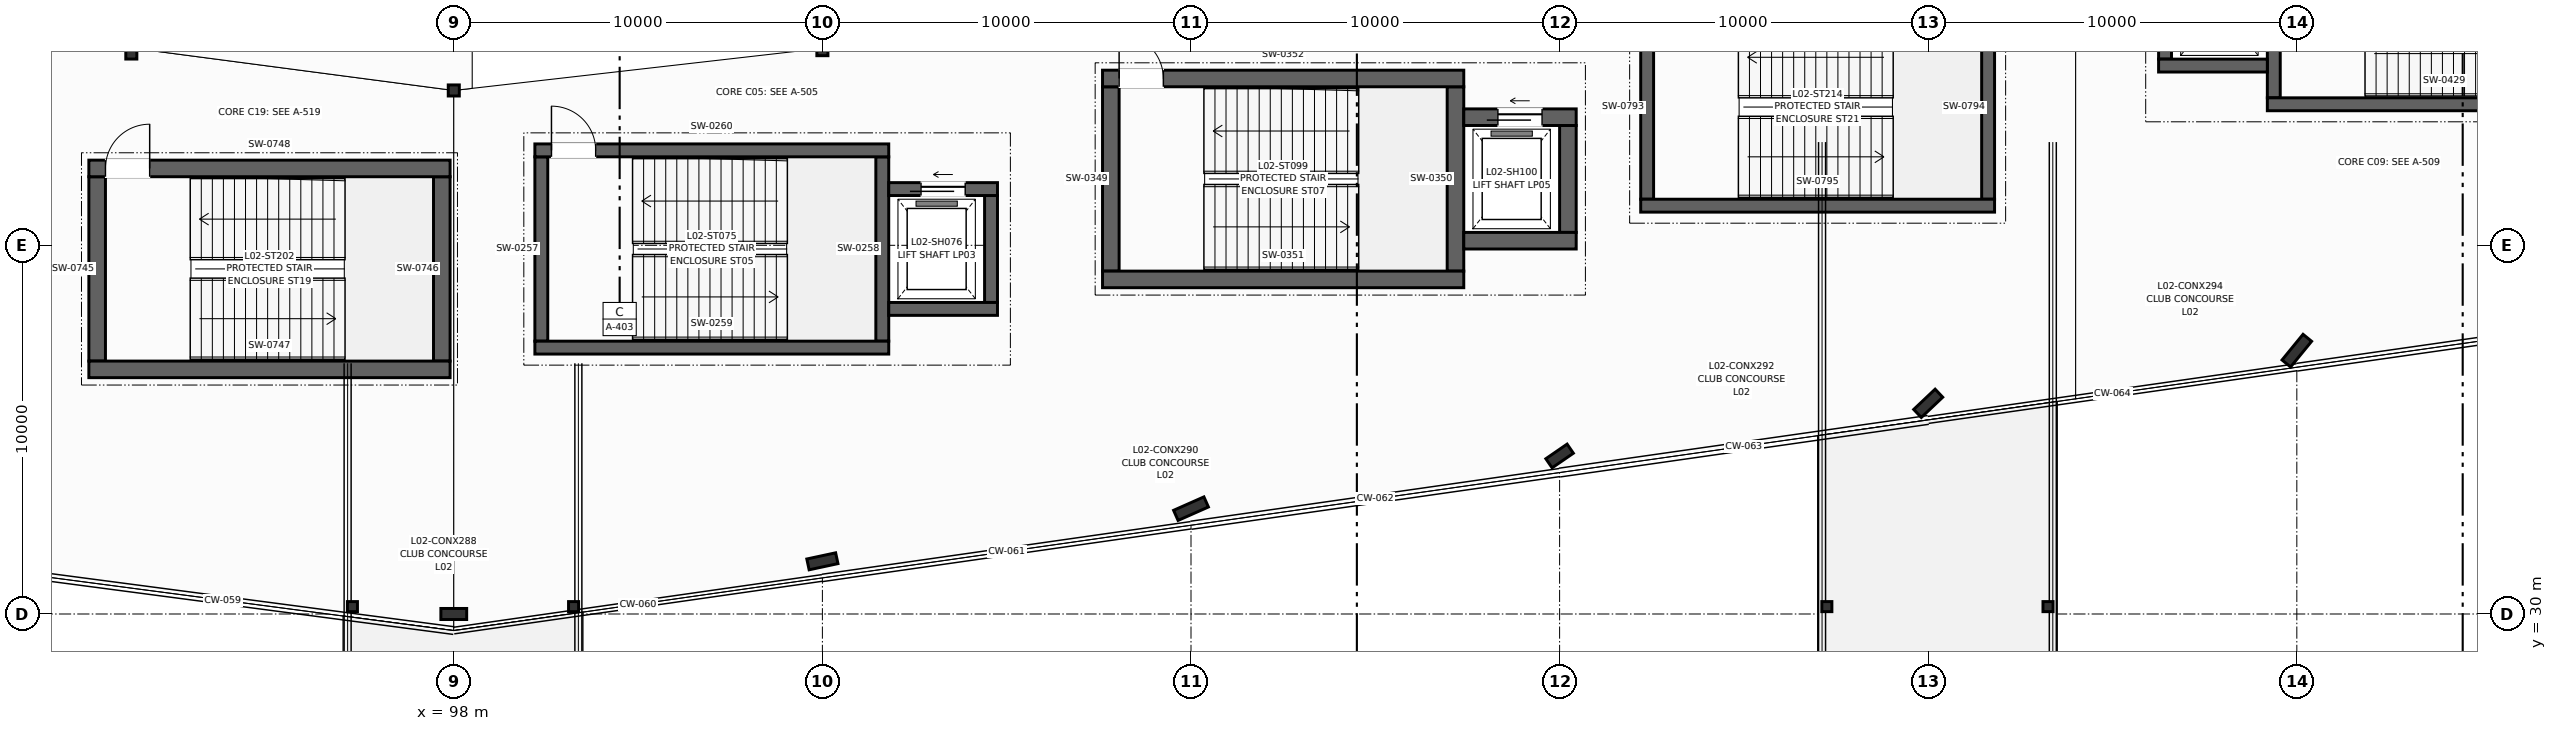
"""IFC4 building model, lengths in metres.
Left out: names, types, materials, properties, quantities, classifications, styles, units other than length and angle.
Written with IfcOpenShell. Run it as: python <this file> out.ifc"""

import sys

from ifc_helpers import new_model, si_unit, direction, frame, frame_2d, origin, origin_2d, place, context, subcontext, project, spatial, rectangle, hollow_circle, i_section, extrude, element, fill, save


model = new_model("IFC4")
c1 = context("Model", 3, precision=1e-05, world=origin(), true_north=direction((0.0, 1.0)))
c2 = subcontext(c1, "Body", "Model", "MODEL_VIEW")
j1 = project(units=[si_unit("LENGTHUNIT", "METRE"), si_unit("PLANEANGLEUNIT", "RADIAN")], contexts=[c1])
p1 = place(None, origin())
s1 = spatial("IfcSite", under=j1, at=p1, CompositionType="ELEMENT")
p2 = place(p1, origin())
s2 = spatial("IfcBuilding", under=s1, at=p2, CompositionType="ELEMENT")
p3 = place(p2, frame((0.0, 0.0, 9.0)))
s3 = spatial("IfcBuildingStorey", under=s2, at=p3, CompositionType="ELEMENT", Elevation=9.0)
p4 = place(p3, frame((89.252, 45.352, 0.0), z_axis=(0.0, 0.0, 1.0), x_axis=(1.0, 0.0, 0.0)))
e1 = element("IfcColumn", 1, at=p4, inside=s3, PredefinedType="COLUMN", context=c2, shape_type="SweptSolid", body=[
    extrude(i_section(OverallWidth=0.3, OverallDepth=0.6, WebThickness=0.015, FlangeThickness=0.03, at=origin_2d()), origin(), (0.0, 0.0, 1.0), 4.5),
])
p5 = place(p3, frame((98.0, 44.2, 0.0), z_axis=(0.0, 0.0, 1.0), x_axis=(1.0, 0.0, 0.0)))
e2 = element("IfcColumn", 2, at=p5, inside=s3, PredefinedType="COLUMN", context=c2, shape_type="SweptSolid", body=[
    extrude(i_section(OverallWidth=0.3, OverallDepth=0.3, WebThickness=0.011, FlangeThickness=0.019, at=origin_2d()), origin(), (0.0, 0.0, 1.0), 4.5),
])
p6 = place(p3, frame((108.0, 45.343, 0.0), z_axis=(0.0, 0.0, 1.0), x_axis=(1.0, 0.0, 0.0)))
e3 = element("IfcColumn", 3, at=p6, inside=s3, PredefinedType="COLUMN", context=c2, shape_type="SweptSolid", body=[
    extrude(i_section(OverallWidth=0.3, OverallDepth=0.4, WebThickness=0.013, FlangeThickness=0.024, at=origin_2d()), origin(), (0.0, 0.0, 1.0), 4.5),
])
p7 = place(p3, frame((98.0, 30.0, 0.0), z_axis=(0.0, 0.0, 1.0), x_axis=(0.0, 1.0, 0.0)))
e4 = element("IfcColumn", 4, at=p7, inside=s3, PredefinedType="COLUMN", context=c2, shape_type="SweptSolid", body=[
    extrude(i_section(OverallWidth=0.3, OverallDepth=0.7, WebThickness=0.017, FlangeThickness=0.032, at=origin_2d()), origin(), (0.0, 0.0, 1.0), 4.5),
])
p8 = place(p3, frame((108.0, 31.429, 0.0), z_axis=(0.0, 0.0, 1.0), x_axis=(-0.209618562904, 0.977783236759, 0.0)))
e5 = element("IfcColumn", 5, at=p8, inside=s3, PredefinedType="COLUMN", context=c2, shape_type="SweptSolid", body=[
    extrude(i_section(OverallWidth=0.3, OverallDepth=0.8, WebThickness=0.018, FlangeThickness=0.033, at=origin_2d()), origin(), (0.0, 0.0, 1.0), 4.5),
])
p9 = place(p3, frame((118.0, 32.857, 0.0), z_axis=(0.0, 0.0, 1.0), x_axis=(-0.40514158678, 0.914253955234, 0.0)))
e6 = element("IfcColumn", 6, at=p9, inside=s3, PredefinedType="COLUMN", context=c2, shape_type="SweptSolid", body=[
    extrude(i_section(OverallWidth=0.3, OverallDepth=0.9, WebThickness=0.019, FlangeThickness=0.035, at=origin_2d()), origin(), (0.0, 0.0, 1.0), 4.5),
])
p10 = place(p3, frame((128.0, 34.286, 0.0), z_axis=(0.0, 0.0, 1.0), x_axis=(-0.566406236925, 0.824126188622, 0.0)))
e7 = element("IfcColumn", 7, at=p10, inside=s3, PredefinedType="COLUMN", context=c2, shape_type="SweptSolid", body=[
    extrude(i_section(OverallWidth=0.3, OverallDepth=0.7, WebThickness=0.017, FlangeThickness=0.032, at=origin_2d()), origin(), (0.0, 0.0, 1.0), 4.5),
])
p11 = place(p3, frame((138.0, 35.714, 0.0), z_axis=(0.0, 0.0, 1.0), x_axis=(-0.687087510804, 0.726574670971, 0.0)))
e8 = element("IfcColumn", 8, at=p11, inside=s3, PredefinedType="COLUMN", context=c2, shape_type="SweptSolid", body=[
    extrude(i_section(OverallWidth=0.3, OverallDepth=0.8, WebThickness=0.018, FlangeThickness=0.033, at=origin_2d()), origin(), (0.0, 0.0, 1.0), 4.5),
])
p12 = place(p3, frame((148.0, 37.143, 0.0), z_axis=(0.0, 0.0, 1.0), x_axis=(-0.773840209727, 0.633380872628, 0.0)))
e9 = element("IfcColumn", 9, at=p12, inside=s3, PredefinedType="COLUMN", context=c2, shape_type="SweptSolid", body=[
    extrude(i_section(OverallWidth=0.3, OverallDepth=0.9, WebThickness=0.019, FlangeThickness=0.035, at=origin_2d()), origin(), (0.0, 0.0, 1.0), 4.5),
])
for number, where, z_axis, x_axis in (
    (10, (95.25, 30.2, 0.0), (0.0, 0.0, 1.0), (1.0, 0.0, 0.0)),
    (11, (101.25, 30.2, 0.0), (0.0, 0.0, 1.0), (1.0, 0.0, 0.0)),
    (12, (135.25, 30.2, 0.0), (0.0, 0.0, 1.0), (1.0, 0.0, 0.0)),
    (13, (141.25, 30.2, 0.0), (0.0, 0.0, 1.0), (1.0, 0.0, 0.0)),
):
    element("IfcColumn", number, at=place(p3, frame(where, z_axis=z_axis, x_axis=x_axis)), inside=s3, PredefinedType="COLUMN", context=c2, shape_type="SweptSolid", body=[
        extrude(hollow_circle(Radius=0.136, WallThickness=0.012, at=origin_2d()), origin(), (0.0, 0.0, 1.0), 3.475),
    ])
for number, where, z_axis, x_axis in (
    (14, (100.375, 37.4, 0.0), (0.0, 0.0, 1.0), (0.0, 1.0, 0.0)),
    (15, (109.625, 37.4, 0.0), (0.0, 0.0, 1.0), (0.0, 1.0, 0.0)),
):
    element("IfcWall", number, at=place(p3, frame(where, z_axis=z_axis, x_axis=x_axis)), inside=s3, PredefinedType="SHEAR", context=c2, shape_type="SweptSolid", body=[
        extrude(rectangle(XDim=5.0, YDim=0.35, at=frame_2d((2.5, 0.0))), origin(), (0.0, 0.0, 1.0), 4.25),
    ])
p13 = place(p3, frame((100.2, 37.225, 0.0), z_axis=(0.0, 0.0, 1.0), x_axis=(1.0, 0.0, 0.0)))
e16 = element("IfcWall", 16, at=p13, inside=s3, PredefinedType="SHEAR", context=c2, shape_type="SweptSolid", body=[
    extrude(rectangle(XDim=9.6, YDim=0.35, at=frame_2d((4.8, 0.0))), origin(), (0.0, 0.0, 1.0), 4.25),
])
p14 = place(p3, frame((100.2, 42.575, 0.0), z_axis=(0.0, 0.0, 1.0), x_axis=(1.0, 0.0, 0.0)))
e17 = element("IfcWall", 17, at=p14, inside=s3, PredefinedType="SHEAR", context=c2, shape_type="SweptSolid", body=[
    extrude(rectangle(XDim=9.6, YDim=0.35, at=frame_2d((4.8, 0.0))), origin(), (0.0, 0.0, 1.0), 4.25),
])
p15 = place(p14, frame((0.45, 0.0, 0.0)))
e18 = element("IfcOpeningElement", 18, at=p15, cuts=e17, PredefinedType="OPENING", context=c2, shape_type="SweptSolid", body=[
    extrude(rectangle(XDim=1.2, YDim=2.2, at=frame_2d((0.6, 1.1))), frame((0.0, 0.185, 0.0), z_axis=(0.0, -1.0, 0.0), x_axis=(1.0, 0.0, 0.0)), (0.0, 0.0, 1.0), 0.37),
])
p16 = place(p3, frame((112.575, 38.45, 0.0), z_axis=(0.0, 0.0, 1.0), x_axis=(0.0, 1.0, 0.0)))
e19 = element("IfcWall", 19, at=p16, inside=s3, PredefinedType="SHEAR", context=c2, shape_type="SweptSolid", body=[
    extrude(rectangle(XDim=2.9, YDim=0.35, at=frame_2d((1.45, 0.0))), origin(), (0.0, 0.0, 1.0), 4.25),
])
p17 = place(p3, frame((109.8, 38.275, 0.0), z_axis=(0.0, 0.0, 1.0), x_axis=(1.0, 0.0, 0.0)))
e20 = element("IfcWall", 20, at=p17, inside=s3, PredefinedType="SHEAR", context=c2, shape_type="SweptSolid", body=[
    extrude(rectangle(XDim=2.95, YDim=0.35, at=frame_2d((1.475, 0.0))), origin(), (0.0, 0.0, 1.0), 4.25),
])
p18 = place(p3, frame((109.8, 41.525, 0.0), z_axis=(0.0, 0.0, 1.0), x_axis=(1.0, 0.0, 0.0)))
e21 = element("IfcWall", 21, at=p18, inside=s3, PredefinedType="SHEAR", context=c2, shape_type="SweptSolid", body=[
    extrude(rectangle(XDim=2.95, YDim=0.35, at=frame_2d((1.475, 0.0))), origin(), (0.0, 0.0, 1.0), 4.25),
])
p19 = place(p18, frame((0.875, 0.0, 0.0)))
e22 = element("IfcOpeningElement", 22, at=p19, cuts=e21, PredefinedType="OPENING", context=c2, shape_type="SweptSolid", body=[
    extrude(rectangle(XDim=1.2, YDim=2.2, at=frame_2d((0.6, 1.1))), frame((0.0, 0.185, 0.0), z_axis=(0.0, -1.0, 0.0), x_axis=(1.0, 0.0, 0.0)), (0.0, 0.0, 1.0), 0.37),
])
for number, where, z_axis, x_axis in (
    (23, (115.825, 39.3, 0.0), (0.0, 0.0, 1.0), (0.0, 1.0, 0.0)),
    (24, (125.175, 39.3, 0.0), (0.0, 0.0, 1.0), (0.0, 1.0, 0.0)),
):
    element("IfcWall", number, at=place(p3, frame(where, z_axis=z_axis, x_axis=x_axis)), inside=s3, PredefinedType="SHEAR", context=c2, shape_type="SweptSolid", body=[
        extrude(rectangle(XDim=5.0, YDim=0.45, at=frame_2d((2.5, 0.0))), origin(), (0.0, 0.0, 1.0), 4.25),
    ])
p20 = place(p3, frame((115.6, 39.075, 0.0), z_axis=(0.0, 0.0, 1.0), x_axis=(1.0, 0.0, 0.0)))
e25 = element("IfcWall", 25, at=p20, inside=s3, PredefinedType="SHEAR", context=c2, shape_type="SweptSolid", body=[
    extrude(rectangle(XDim=9.8, YDim=0.45, at=frame_2d((4.9, 0.0))), origin(), (0.0, 0.0, 1.0), 4.25),
])
p21 = place(p3, frame((115.6, 44.525, 0.0), z_axis=(0.0, 0.0, 1.0), x_axis=(1.0, 0.0, 0.0)))
e26 = element("IfcWall", 26, at=p21, inside=s3, PredefinedType="SHEAR", context=c2, shape_type="SweptSolid", body=[
    extrude(rectangle(XDim=9.8, YDim=0.45, at=frame_2d((4.9, 0.0))), origin(), (0.0, 0.0, 1.0), 4.25),
])
p22 = place(p21, frame((0.45, 0.0, 0.0)))
e27 = element("IfcOpeningElement", 27, at=p22, cuts=e26, PredefinedType="OPENING", context=c2, shape_type="SweptSolid", body=[
    extrude(rectangle(XDim=1.2, YDim=2.2, at=frame_2d((0.6, 1.1))), frame((0.0, 0.235, 0.0), z_axis=(0.0, -1.0, 0.0), x_axis=(1.0, 0.0, 0.0)), (0.0, 0.0, 1.0), 0.47),
])
p23 = place(p3, frame((128.225, 40.35, 0.0), z_axis=(0.0, 0.0, 1.0), x_axis=(0.0, 1.0, 0.0)))
e28 = element("IfcWall", 28, at=p23, inside=s3, PredefinedType="SHEAR", context=c2, shape_type="SweptSolid", body=[
    extrude(rectangle(XDim=2.9, YDim=0.45, at=frame_2d((1.45, 0.0))), origin(), (0.0, 0.0, 1.0), 4.25),
])
p24 = place(p3, frame((125.4, 40.125, 0.0), z_axis=(0.0, 0.0, 1.0), x_axis=(1.0, 0.0, 0.0)))
e29 = element("IfcWall", 29, at=p24, inside=s3, PredefinedType="SHEAR", context=c2, shape_type="SweptSolid", body=[
    extrude(rectangle(XDim=3.05, YDim=0.45, at=frame_2d((1.525, 0.0))), origin(), (0.0, 0.0, 1.0), 4.25),
])
p25 = place(p3, frame((125.4, 43.475, 0.0), z_axis=(0.0, 0.0, 1.0), x_axis=(1.0, 0.0, 0.0)))
e30 = element("IfcWall", 30, at=p25, inside=s3, PredefinedType="SHEAR", context=c2, shape_type="SweptSolid", body=[
    extrude(rectangle(XDim=3.05, YDim=0.45, at=frame_2d((1.525, 0.0))), origin(), (0.0, 0.0, 1.0), 4.25),
])
p26 = place(p25, frame((0.925, 0.0, 0.0)))
e31 = element("IfcOpeningElement", 31, at=p26, cuts=e30, PredefinedType="OPENING", context=c2, shape_type="SweptSolid", body=[
    extrude(rectangle(XDim=1.2, YDim=2.2, at=frame_2d((0.6, 1.1))), frame((0.0, 0.235, 0.0), z_axis=(0.0, -1.0, 0.0), x_axis=(1.0, 0.0, 0.0)), (0.0, 0.0, 1.0), 0.47),
])
p27 = place(p3, frame((147.375, 44.0, 0.0), z_axis=(0.0, 0.0, 1.0), x_axis=(0.0, 1.0, 0.0)))
e32 = element("IfcWall", 32, at=p27, inside=s3, PredefinedType="SHEAR", context=c2, shape_type="SweptSolid", body=[
    extrude(rectangle(XDim=5.0, YDim=0.35, at=frame_2d((2.5, 0.0))), origin(), (0.0, 0.0, 1.0), 4.25),
])
p28 = place(p3, frame((147.2, 43.825, 0.0), z_axis=(0.0, 0.0, 1.0), x_axis=(1.0, 0.0, 0.0)))
e33 = element("IfcWall", 33, at=p28, inside=s3, PredefinedType="SHEAR", context=c2, shape_type="SweptSolid", body=[
    extrude(rectangle(XDim=9.6, YDim=0.35, at=frame_2d((4.8, 0.0))), origin(), (0.0, 0.0, 1.0), 4.25),
])
p29 = place(p3, frame((144.425, 45.05, 0.0), z_axis=(0.0, 0.0, 1.0), x_axis=(0.0, 1.0, 0.0)))
e34 = element("IfcWall", 34, at=p29, inside=s3, PredefinedType="SHEAR", context=c2, shape_type="SweptSolid", body=[
    extrude(rectangle(XDim=2.9, YDim=0.35, at=frame_2d((1.45, 0.0))), origin(), (0.0, 0.0, 1.0), 4.25),
])
p30 = place(p3, frame((144.25, 44.875, 0.0), z_axis=(0.0, 0.0, 1.0), x_axis=(1.0, 0.0, 0.0)))
e35 = element("IfcWall", 35, at=p30, inside=s3, PredefinedType="SHEAR", context=c2, shape_type="SweptSolid", body=[
    extrude(rectangle(XDim=2.95, YDim=0.35, at=frame_2d((1.475, 0.0))), origin(), (0.0, 0.0, 1.0), 4.25),
])
for number, where, z_axis, x_axis in (
    (36, (88.325, 36.86, 0.0), (0.0, 0.0, 1.0), (0.0, 1.0, 0.0)),
    (37, (97.675, 36.86, 0.0), (0.0, 0.0, 1.0), (0.0, 1.0, 0.0)),
):
    element("IfcWall", number, at=place(p3, frame(where, z_axis=z_axis, x_axis=x_axis)), inside=s3, PredefinedType="SHEAR", context=c2, shape_type="SweptSolid", body=[
        extrude(rectangle(XDim=5.0, YDim=0.45, at=frame_2d((2.5, 0.0))), origin(), (0.0, 0.0, 1.0), 4.25),
    ])
p31 = place(p3, frame((88.1, 36.635, 0.0), z_axis=(0.0, 0.0, 1.0), x_axis=(1.0, 0.0, 0.0)))
e38 = element("IfcWall", 38, at=p31, inside=s3, PredefinedType="SHEAR", context=c2, shape_type="SweptSolid", body=[
    extrude(rectangle(XDim=9.8, YDim=0.45, at=frame_2d((4.9, 0.0))), origin(), (0.0, 0.0, 1.0), 4.25),
])
p32 = place(p3, frame((88.1, 42.085, 0.0), z_axis=(0.0, 0.0, 1.0), x_axis=(1.0, 0.0, 0.0)))
e39 = element("IfcWall", 39, at=p32, inside=s3, PredefinedType="SHEAR", context=c2, shape_type="SweptSolid", body=[
    extrude(rectangle(XDim=9.8, YDim=0.45, at=frame_2d((4.9, 0.0))), origin(), (0.0, 0.0, 1.0), 4.25),
])
p33 = place(p32, frame((0.45, 0.0, 0.0)))
e40 = element("IfcOpeningElement", 40, at=p33, cuts=e39, PredefinedType="OPENING", context=c2, shape_type="SweptSolid", body=[
    extrude(rectangle(XDim=1.2, YDim=2.2, at=frame_2d((0.6, 1.1))), frame((0.0, 0.235, 0.0), z_axis=(0.0, -1.0, 0.0), x_axis=(1.0, 0.0, 0.0)), (0.0, 0.0, 1.0), 0.47),
])
for number, where, z_axis, x_axis in (
    (41, (130.375, 41.25, 0.0), (0.0, 0.0, 1.0), (0.0, 1.0, 0.0)),
    (42, (139.625, 41.25, 0.0), (0.0, 0.0, 1.0), (0.0, 1.0, 0.0)),
):
    element("IfcWall", number, at=place(p3, frame(where, z_axis=z_axis, x_axis=x_axis)), inside=s3, PredefinedType="SHEAR", context=c2, shape_type="SweptSolid", body=[
        extrude(rectangle(XDim=5.0, YDim=0.35, at=frame_2d((2.5, 0.0))), origin(), (0.0, 0.0, 1.0), 4.25),
    ])
p34 = place(p3, frame((130.2, 41.075, 0.0), z_axis=(0.0, 0.0, 1.0), x_axis=(1.0, 0.0, 0.0)))
e43 = element("IfcWall", 43, at=p34, inside=s3, PredefinedType="SHEAR", context=c2, shape_type="SweptSolid", body=[
    extrude(rectangle(XDim=9.6, YDim=0.35, at=frame_2d((4.8, 0.0))), origin(), (0.0, 0.0, 1.0), 4.25),
])
p35 = place(p15, origin())
e44 = element("IfcDoor", 44, at=p35, inside=s3, OperationType="SINGLE_SWING_LEFT", PredefinedType="DOOR", context=c2, shape_type="SweptSolid", body=[
    extrude(rectangle(XDim=1.2, YDim=2.2, at=frame_2d((0.6, 1.1))), frame((0.0, 0.025, 0.0), z_axis=(0.0, -1.0, 0.0), x_axis=(1.0, 0.0, 0.0)), (0.0, 0.0, 1.0), 0.05),
])
fill(e18, e44)
p36 = place(p19, origin())
e45 = element("IfcDoor", 45, at=p36, inside=s3, OperationType="SLIDING_TO_LEFT", PredefinedType="DOOR", context=c2, shape_type="SweptSolid", body=[
    extrude(rectangle(XDim=1.2, YDim=2.2, at=frame_2d((0.6, 1.1))), frame((0.0, 0.025, 0.0), z_axis=(0.0, -1.0, 0.0), x_axis=(1.0, 0.0, 0.0)), (0.0, 0.0, 1.0), 0.05),
])
fill(e22, e45)
p37 = place(p22, origin())
e46 = element("IfcDoor", 46, at=p37, inside=s3, OperationType="SINGLE_SWING_LEFT", PredefinedType="DOOR", context=c2, shape_type="SweptSolid", body=[
    extrude(rectangle(XDim=1.2, YDim=2.2, at=frame_2d((0.6, 1.1))), frame((0.0, 0.025, 0.0), z_axis=(0.0, -1.0, 0.0), x_axis=(1.0, 0.0, 0.0)), (0.0, 0.0, 1.0), 0.05),
])
fill(e27, e46)
p38 = place(p26, origin())
e47 = element("IfcDoor", 47, at=p38, inside=s3, OperationType="SLIDING_TO_LEFT", PredefinedType="DOOR", context=c2, shape_type="SweptSolid", body=[
    extrude(rectangle(XDim=1.2, YDim=2.2, at=frame_2d((0.6, 1.1))), frame((0.0, 0.025, 0.0), z_axis=(0.0, -1.0, 0.0), x_axis=(1.0, 0.0, 0.0)), (0.0, 0.0, 1.0), 0.05),
])
fill(e31, e47)
p39 = place(p33, origin())
e48 = element("IfcDoor", 48, at=p39, inside=s3, OperationType="SINGLE_SWING_RIGHT", PredefinedType="DOOR", context=c2, shape_type="SweptSolid", body=[
    extrude(rectangle(XDim=1.2, YDim=2.2, at=frame_2d((0.6, 1.1))), frame((0.0, 0.025, 0.0), z_axis=(0.0, -1.0, 0.0), x_axis=(1.0, 0.0, 0.0)), (0.0, 0.0, 1.0), 0.05),
])
fill(e40, e48)
save(model, sys.argv[1])
